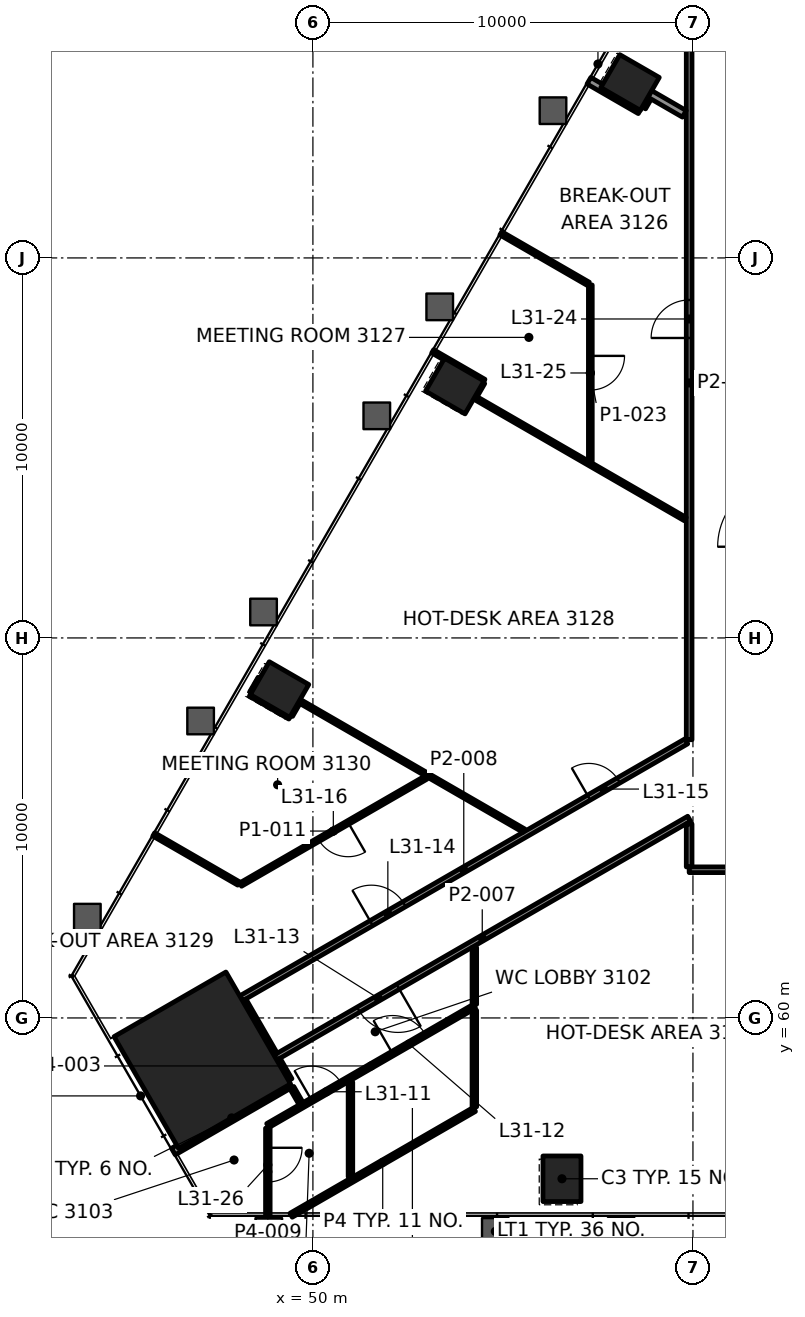
"""IFC4 building model, lengths in metres.
Left out: names, types, materials, properties, quantities, classifications, styles, units other than length and angle.
Written with IfcOpenShell. Run it as: python <this file> out.ifc"""

import sys

from ifc_helpers import new_model, si_unit, direction, frame, frame_2d, origin, origin_2d, place, context, subcontext, project, spatial, rectangle, extrude, element, fill, save


model = new_model("IFC4")
c1 = context("Model", 3, precision=1e-05, world=origin(), true_north=direction((0.0, 1.0)))
c2 = subcontext(c1, "Body", "Model", "MODEL_VIEW")
j1 = project(units=[si_unit("LENGTHUNIT", "METRE"), si_unit("PLANEANGLEUNIT", "RADIAN")], contexts=[c1])
p1 = place(None, origin())
s1 = spatial("IfcSite", under=j1, at=p1, CompositionType="ELEMENT")
p2 = place(p1, origin())
s2 = spatial("IfcBuilding", under=s1, at=p2, CompositionType="ELEMENT")
p3 = place(p2, frame((0.0, 0.0, 136.6)))
s3 = spatial("IfcBuildingStorey", under=s2, at=p3, CompositionType="ELEMENT", Elevation=136.6)
p4 = place(p3, frame((47.089, 58.886, 0.0), z_axis=(0.0, 0.0, 1.0), x_axis=(0.5, -0.866025403784, 0.0)))
e1 = element("IfcColumn", 1, at=p4, inside=s3, PredefinedType="COLUMN", context=c2, shape_type="SweptSolid", body=[
    extrude(rectangle(XDim=3.4, YDim=3.4, at=origin_2d()), origin(), (0.0, 0.0, 1.0), 4.2),
])
for number, where, z_axis, x_axis in (
    (2, (56.554, 55.768, -0.0), (0.0, 0.0, 1.0), (1.0, 0.0, 0.0)),
    (3, (58.345, 84.616, -0.0), (0.0, 0.0, 1.0), (-0.5, -0.866, 0.0)),
    (4, (53.733, 76.628, -0.0), (0.0, 0.0, 1.0), (-0.5, -0.866, 0.0)),
    (5, (49.122, 68.641, -0.0), (0.0, 0.0, 1.0), (-0.5, -0.866, 0.0)),
):
    element("IfcColumn", number, at=place(p3, frame(where, z_axis=z_axis, x_axis=x_axis)), inside=s3, PredefinedType="COLUMN", context=c2, shape_type="SweptSolid", body=[
        extrude(rectangle(XDim=1.0, YDim=1.2, at=origin_2d()), origin(), (0.0, 0.0, 1.0), 4.2),
    ])
p5 = place(p3, frame((90.1, 63.9, 0.0), z_axis=(0.0, 0.0, 1.0), x_axis=(-1.0, 0.0, 0.0)))
e6 = element("IfcWall", 6, at=p5, inside=s3, PredefinedType="PARTITIONING", context=c2, shape_type="SweptSolid", body=[
    extrude(rectangle(XDim=30.199, YDim=0.15, at=frame_2d((15.1, 0.0))), origin(), (0.0, 0.0, 1.0), 3.3),
])
p6 = place(p5, frame((5.999, 0.0, 0.0)))
e7 = element("IfcOpeningElement", 7, at=p6, cuts=e6, PredefinedType="OPENING", context=c2, shape_type="SweptSolid", body=[
    extrude(rectangle(XDim=1.0, YDim=2.1, at=frame_2d((0.5, 1.05))), frame((0.0, 0.085, 0.0), z_axis=(0.0, -1.0, 0.0), x_axis=(1.0, 0.0, 0.0)), (0.0, 0.0, 1.0), 0.17),
])
p7 = place(p5, frame((20.795, 0.0, 0.0)))
e8 = element("IfcOpeningElement", 8, at=p7, cuts=e6, PredefinedType="OPENING", context=c2, shape_type="SweptSolid", body=[
    extrude(rectangle(XDim=1.2, YDim=2.1, at=frame_2d((0.6, 1.05))), frame((0.0, 0.085, 0.0), z_axis=(0.0, -1.0, 0.0), x_axis=(1.0, 0.0, 0.0)), (0.0, 0.0, 1.0), 0.17),
])
p8 = place(p3, frame((49.427, 54.808, 0.0), z_axis=(0.0, 0.0, 1.0), x_axis=(0.866021245731, 0.500007201891, 0.0)))
e9 = element("IfcWall", 9, at=p8, inside=s3, PredefinedType="PARTITIONING", context=c2, shape_type="SweptSolid", body=[
    extrude(rectangle(XDim=5.566, YDim=0.12, at=frame_2d((2.783, 0.0))), origin(), (0.0, 0.0, 1.0), 3.3),
])
p9 = place(p3, frame((48.814, 57.168, 0.0), z_axis=(0.0, 0.0, 1.0), x_axis=(0.866009986161, 0.500026703156, 0.0)))
e10 = element("IfcWall", 10, at=p9, inside=s3, PredefinedType="PARTITIONING", context=c2, shape_type="SweptSolid", body=[
    extrude(rectangle(XDim=6.275, YDim=0.12, at=frame_2d((3.137, 0.0))), origin(), (0.0, 0.0, 1.0), 3.3),
])
p10 = place(p9, frame((1.329, 0.0, 0.0)))
e11 = element("IfcOpeningElement", 11, at=p10, cuts=e10, PredefinedType="OPENING", context=c2, shape_type="SweptSolid", body=[
    extrude(rectangle(XDim=0.9, YDim=2.1, at=frame_2d((0.45, 1.05))), frame((0.0, 0.07, 0.0), z_axis=(0.0, -1.0, 0.0), x_axis=(1.0, 0.0, 0.0)), (0.0, 0.0, 1.0), 0.14),
])
p11 = place(p9, frame((3.791, 0.0, 0.0)))
e12 = element("IfcOpeningElement", 12, at=p11, cuts=e10, PredefinedType="OPENING", context=c2, shape_type="SweptSolid", body=[
    extrude(rectangle(XDim=1.0, YDim=2.1, at=frame_2d((0.5, 1.05))), frame((0.0, 0.07, 0.0), z_axis=(0.0, -1.0, 0.0), x_axis=(1.0, 0.0, 0.0)), (0.0, 0.0, 1.0), 0.14),
])
p12 = place(p3, frame((46.329, 56.484, 0.0), z_axis=(0.0, 0.0, 1.0), x_axis=(0.866034141321, 0.499984865837, 0.0)))
e13 = element("IfcWall", 13, at=p12, inside=s3, PredefinedType="PARTITIONING", context=c2, shape_type="SweptSolid", body=[
    extrude(rectangle(XDim=3.543, YDim=0.2, at=frame_2d((1.772, 0.0))), origin(), (0.0, 0.0, 1.0), 3.3),
])
p13 = place(p3, frame((59.9, 65.243, 0.0), z_axis=(0.0, 0.0, 1.0), x_axis=(-0.866021305353, -0.500007098624, 0.0)))
e14 = element("IfcWall", 14, at=p13, inside=s3, PredefinedType="PARTITIONING", context=c2, shape_type="SweptSolid", body=[
    extrude(rectangle(XDim=12.572, YDim=0.15, at=frame_2d((6.286, 0.0))), origin(), (0.0, 0.0, 1.0), 3.147),
])
p14 = place(p13, frame((8.848, 0.0, 0.0)))
e15 = element("IfcOpeningElement", 15, at=p14, cuts=e14, PredefinedType="OPENING", context=c2, shape_type="SweptSolid", body=[
    extrude(rectangle(XDim=1.2, YDim=2.1, at=frame_2d((0.6, 1.05))), frame((0.0, 0.085, 0.0), z_axis=(0.0, -1.0, 0.0), x_axis=(1.0, 0.0, 0.0)), (0.0, 0.0, 1.0), 0.17),
])
p15 = place(p3, frame((48.114, 60.517, 0.0), z_axis=(0.0, 0.0, 1.0), x_axis=(0.866023530324, 0.500003244914, 0.0)))
e16 = element("IfcWall", 16, at=p15, inside=s3, PredefinedType="PARTITIONING", context=c2, shape_type="SweptSolid", body=[
    extrude(rectangle(XDim=13.522, YDim=0.15, at=frame_2d((6.761, 0.0))), origin(), (0.0, 0.0, 1.0), 3.3),
])
p16 = place(p15, frame((3.954, 0.0, 0.0)))
e17 = element("IfcOpeningElement", 17, at=p16, cuts=e16, PredefinedType="OPENING", context=c2, shape_type="SweptSolid", body=[
    extrude(rectangle(XDim=1.0, YDim=2.1, at=frame_2d((0.5, 1.05))), frame((0.0, 0.085, 0.0), z_axis=(0.0, -1.0, 0.0), x_axis=(1.0, 0.0, 0.0)), (0.0, 0.0, 1.0), 0.17),
])
p17 = place(p15, frame((10.562, 0.0, 0.0)))
e18 = element("IfcOpeningElement", 18, at=p17, cuts=e16, PredefinedType="OPENING", context=c2, shape_type="SweptSolid", body=[
    extrude(rectangle(XDim=0.9, YDim=2.1, at=frame_2d((0.45, 1.05))), frame((0.0, 0.085, 0.0), z_axis=(0.0, -1.0, 0.0), x_axis=(1.0, 0.0, 0.0)), (0.0, 0.0, 1.0), 0.17),
])
p18 = place(p3, frame((52.978, 66.327, 0.0), z_axis=(0.0, 0.0, 1.0), x_axis=(-0.86603265506, -0.499987440211, 0.0)))
e19 = element("IfcWall", 19, at=p18, inside=s3, PredefinedType="PARTITIONING", context=c2, shape_type="SweptSolid", body=[
    extrude(rectangle(XDim=5.636, YDim=0.1, at=frame_2d((2.818, 0.0))), origin(), (0.0, 0.0, 1.0), 3.3),
])
p19 = place(p18, frame((2.368, 0.0, 0.0)))
e20 = element("IfcOpeningElement", 20, at=p19, cuts=e19, PredefinedType="OPENING", context=c2, shape_type="SweptSolid", body=[
    extrude(rectangle(XDim=0.9, YDim=2.1, at=frame_2d((0.45, 1.05))), frame((0.0, 0.06, 0.0), z_axis=(0.0, -1.0, 0.0), x_axis=(1.0, 0.0, 0.0)), (0.0, 0.0, 1.0), 0.12),
])
p20 = place(p3, frame((49.421, 67.96, 0.0), z_axis=(0.0, 0.0, 1.0), x_axis=(0.500246304613, 0.865883153041, 0.0)))
e21 = element("IfcWall", 21, at=p20, inside=s3, PredefinedType="PARTITIONING", context=c2, shape_type="SweptSolid", body=[
    extrude(rectangle(XDim=0.39, YDim=0.1, at=frame_2d((0.195, 0.0))), origin(), (0.0, 0.0, 1.0), 3.3),
])
p21 = place(p3, frame((54.278, 76.372, 0.0), z_axis=(0.0, 0.0, 1.0), x_axis=(0.50002266109, 0.866012320003, 0.0)))
e22 = element("IfcWall", 22, at=p21, inside=s3, PredefinedType="PARTITIONING", context=c2, shape_type="SweptSolid", body=[
    extrude(rectangle(XDim=0.399, YDim=0.1, at=frame_2d((0.199, 0.0))), origin(), (0.0, 0.0, 1.0), 3.3),
])
p22 = place(p3, frame((58.666, 83.972, 0.0), z_axis=(0.0, 0.0, 1.0), x_axis=(0.500030943131, 0.866007538022, 0.0)))
e23 = element("IfcWall", 23, at=p22, inside=s3, PredefinedType="PARTITIONING", context=c2, shape_type="SweptSolid", body=[
    extrude(rectangle(XDim=0.297, YDim=0.2, at=frame_2d((0.148, 0.0))), origin(), (0.0, 0.0, 1.0), 3.3),
])
p23 = place(p3, frame((48.38, 68.557, 0.0), z_axis=(0.0, 0.0, 1.0), x_axis=(0.500406136638, 0.865790793677, 0.0)))
e24 = element("IfcWall", 24, at=p23, inside=s3, PredefinedType="PARTITIONING", context=c2, shape_type="SweptSolid", body=[
    extrude(rectangle(XDim=0.443, YDim=0.1, at=frame_2d((0.222, 0.0))), origin(), (0.0, 0.0, 1.0), 3.3),
])
p24 = place(p3, frame((59.9, 63.976, 0.0), z_axis=(0.0, 0.0, 1.0), x_axis=(0.0, 1.0, 0.0)))
e25 = element("IfcWall", 25, at=p24, inside=s3, PredefinedType="PARTITIONING", context=c2, shape_type="SweptSolid", body=[
    extrude(rectangle(XDim=1.131, YDim=0.15, at=frame_2d((0.565, 0.0))), origin(), (0.0, 0.0, 1.0), 3.147),
])
p25 = place(p3, frame((59.9, 67.321, 0.0), z_axis=(0.0, 0.0, 1.0), x_axis=(0.0, 1.0, 0.0)))
e26 = element("IfcWall", 26, at=p25, inside=s3, PredefinedType="PARTITIONING", context=c2, shape_type="SweptSolid", body=[
    extrude(rectangle(XDim=18.778, YDim=0.15, at=frame_2d((9.389, 0.0))), origin(), (0.0, 0.0, 1.0), 3.3),
])
p26 = place(p25, frame((10.572, 0.0, 0.0)))
e27 = element("IfcOpeningElement", 27, at=p26, cuts=e26, PredefinedType="OPENING", context=c2, shape_type="SweptSolid", body=[
    extrude(rectangle(XDim=1.0, YDim=2.1, at=frame_2d((0.5, 1.05))), frame((0.0, 0.085, 0.0), z_axis=(0.0, -1.0, 0.0), x_axis=(1.0, 0.0, 0.0)), (0.0, 0.0, 1.0), 0.17),
])
p27 = place(p3, frame((57.3, 79.288, 0.0), z_axis=(0.0, 0.0, 1.0), x_axis=(0.0, -1.0, 0.0)))
e28 = element("IfcWall", 28, at=p27, inside=s3, PredefinedType="PARTITIONING", context=c2, shape_type="SweptSolid", body=[
    extrude(rectangle(XDim=4.631, YDim=0.1, at=frame_2d((2.315, 0.0))), origin(), (0.0, 0.0, 1.0), 3.3),
])
p28 = place(p27, frame((1.865, 0.0, 0.0)))
e29 = element("IfcOpeningElement", 29, at=p28, cuts=e28, PredefinedType="OPENING", context=c2, shape_type="SweptSolid", body=[
    extrude(rectangle(XDim=0.9, YDim=2.1, at=frame_2d((0.45, 1.05))), frame((0.0, 0.06, 0.0), z_axis=(0.0, -1.0, 0.0), x_axis=(1.0, 0.0, 0.0)), (0.0, 0.0, 1.0), 0.12),
])
p29 = place(p3, frame((54.248, 57.661, 0.0), z_axis=(0.0, 0.0, 1.0), x_axis=(0.0, 1.0, 0.0)))
e30 = element("IfcWall", 30, at=p29, inside=s3, PredefinedType="PARTITIONING", context=c2, shape_type="SweptSolid", body=[
    extrude(rectangle(XDim=2.54, YDim=0.12, at=frame_2d((1.27, 0.0))), origin(), (0.0, 0.0, 1.0), 3.3),
])
p30 = place(p3, frame((50.988, 55.819, 0.0), z_axis=(0.0, 0.0, 1.0), x_axis=(0.0, 1.0, 0.0)))
e31 = element("IfcWall", 31, at=p30, inside=s3, PredefinedType="PARTITIONING", context=c2, shape_type="SweptSolid", body=[
    extrude(rectangle(XDim=2.495, YDim=0.12, at=frame_2d((1.248, 0.0))), origin(), (0.0, 0.0, 1.0), 3.3),
])
p31 = place(p3, frame((48.814, 57.099, 0.0), z_axis=(0.0, 0.0, 1.0), x_axis=(0.0, -1.0, 0.0)))
e32 = element("IfcWall", 32, at=p31, inside=s3, PredefinedType="PARTITIONING", context=c2, shape_type="SweptSolid", body=[
    extrude(rectangle(XDim=2.291, YDim=0.12, at=frame_2d((1.145, 0.0))), origin(), (0.0, 0.0, 1.0), 3.3),
])
p32 = place(p31, frame((0.515, 0.0, 0.0)))
e33 = element("IfcOpeningElement", 33, at=p32, cuts=e32, PredefinedType="OPENING", context=c2, shape_type="SweptSolid", body=[
    extrude(rectangle(XDim=0.9, YDim=2.1, at=frame_2d((0.45, 1.05))), frame((0.0, 0.07, 0.0), z_axis=(0.0, -1.0, 0.0), x_axis=(1.0, 0.0, 0.0)), (0.0, 0.0, 1.0), 0.14),
])
p33 = place(p3, frame((49.362, 58.351, 0.0), z_axis=(0.0, 0.0, 1.0), x_axis=(-0.499880341542, 0.866094477606, 0.0)))
e34 = element("IfcWall", 34, at=p33, inside=s3, PredefinedType="PARTITIONING", context=c2, shape_type="SweptSolid", body=[
    extrude(rectangle(XDim=0.625, YDim=0.2, at=frame_2d((0.312, 0.0))), origin(), (0.0, 0.0, 1.0), 3.3),
])
p34 = place(p3, frame((49.685, 57.751, 0.0), z_axis=(0.0, 0.0, 1.0), x_axis=(-0.499913221443, 0.866075499611, 0.0)))
e35 = element("IfcWall", 35, at=p34, inside=s3, PredefinedType="PARTITIONING", context=c2, shape_type="SweptSolid", body=[
    extrude(rectangle(XDim=0.48, YDim=0.12, at=frame_2d((0.24, 0.0))), origin(), (0.0, 0.0, 1.0), 3.3),
])
p35 = place(p3, frame((59.773, 83.792, 0.0), z_axis=(0.0, 0.0, 1.0), x_axis=(-0.866057688017, 0.499944077899, 0.0)))
e36 = element("IfcWall", 36, at=p35, inside=s3, PredefinedType="PARTITIONING", context=c2, shape_type="SweptSolid", body=[
    extrude(rectangle(XDim=1.049, YDim=0.2, at=frame_2d((0.524, 0.0))), origin(), (0.0, 0.0, 1.0), 3.3),
])
p36 = place(p3, frame((58.612, 83.885, 0.0), z_axis=(0.0, 0.0, 1.0), x_axis=(-0.866005410122, 0.500034628441, 0.0)))
e37 = element("IfcWall", 37, at=p36, inside=s3, PredefinedType="PARTITIONING", context=c2, shape_type="SweptSolid", body=[
    extrude(rectangle(XDim=1.557, YDim=0.2, at=frame_2d((0.779, 0.0))), origin(), (0.0, 0.0, 1.0), 3.065),
])
p37 = place(p3, frame((57.25, 79.316, 0.0), z_axis=(0.0, 0.0, 1.0), x_axis=(-0.866038956489, 0.499976525293, 0.0)))
e38 = element("IfcWall", 38, at=p37, inside=s3, PredefinedType="PARTITIONING", context=c2, shape_type="SweptSolid", body=[
    extrude(rectangle(XDim=2.662, YDim=0.1, at=frame_2d((1.331, 0.0))), origin(), (0.0, 0.0, 1.0), 3.065),
])
p38 = place(p3, frame((54.502, 76.762, 0.0), z_axis=(0.0, 0.0, 1.0), x_axis=(-0.866018739521, 0.500011542666, 0.0)))
e39 = element("IfcWall", 39, at=p38, inside=s3, PredefinedType="PARTITIONING", context=c2, shape_type="SweptSolid", body=[
    extrude(rectangle(XDim=1.56, YDim=0.1, at=frame_2d((0.78, 0.0))), origin(), (0.0, 0.0, 1.0), 3.065),
])
p39 = place(p3, frame((59.799, 73.126, 0.0), z_axis=(0.0, 0.0, 1.0), x_axis=(-0.866017336907, 0.500013971981, 0.0)))
e40 = element("IfcWall", 40, at=p39, inside=s3, PredefinedType="PARTITIONING", context=c2, shape_type="SweptSolid", body=[
    extrude(rectangle(XDim=6.404, YDim=0.1, at=frame_2d((3.202, 0.0))), origin(), (0.0, 0.0, 1.0), 3.3),
])
p40 = place(p3, frame((55.553, 64.928, 0.0), z_axis=(0.0, 0.0, 1.0), x_axis=(-0.866024775297, 0.500001088571, 0.0)))
e41 = element("IfcWall", 41, at=p40, inside=s3, PredefinedType="PARTITIONING", context=c2, shape_type="SweptSolid", body=[
    extrude(rectangle(XDim=6.826, YDim=0.1, at=frame_2d((3.413, 0.0))), origin(), (0.0, 0.0, 1.0), 3.3),
])
p41 = place(p3, frame((49.391, 67.908, 0.0), z_axis=(0.0, 0.0, 1.0), x_axis=(-0.866006032174, 0.500033551112, 0.0)))
e42 = element("IfcWall", 42, at=p41, inside=s3, PredefinedType="PARTITIONING", context=c2, shape_type="SweptSolid", body=[
    extrude(rectangle(XDim=1.2, YDim=0.1, at=frame_2d((0.6, 0.0))), origin(), (0.0, 0.0, 1.0), 3.3),
])
p42 = place(p3, frame((48.047, 63.538, 0.0), z_axis=(0.0, 0.0, 1.0), x_axis=(-0.866010727845, 0.500025418611, 0.0)))
e43 = element("IfcWall", 43, at=p42, inside=s3, PredefinedType="PARTITIONING", context=c2, shape_type="SweptSolid", body=[
    extrude(rectangle(XDim=2.581, YDim=0.1, at=frame_2d((1.291, 0.0))), origin(), (0.0, 0.0, 1.0), 3.3),
])
p43 = place(p3, frame((54.248, 60.357, 0.0), z_axis=(0.0, 0.0, 1.0), x_axis=(0.0, 1.0, 0.0)))
e44 = element("IfcWall", 44, at=p43, inside=s3, PredefinedType="PARTITIONING", context=c2, shape_type="SweptSolid", body=[
    extrude(rectangle(XDim=1.496, YDim=0.12, at=frame_2d((0.748, 0.0))), origin(), (0.0, 0.0, 1.0), 3.3),
])
p44 = place(p3, frame((48.975, 59.022, 0.0), z_axis=(0.0, 0.0, 1.0), x_axis=(-0.500013311227, 0.866017718408, 0.0)))
e45 = element("IfcWall", 45, at=p44, inside=s3, PredefinedType="PARTITIONING", context=c2, shape_type="SweptSolid", body=[
    extrude(rectangle(XDim=1.647, YDim=0.2, at=frame_2d((0.823, 0.0))), origin(), (0.0, 0.0, 1.0), 3.147),
])
p45 = place(p10, origin())
e46 = element("IfcDoor", 46, at=p45, inside=s3, OperationType="SINGLE_SWING_LEFT", PredefinedType="DOOR", context=c2, shape_type="SweptSolid", body=[
    extrude(rectangle(XDim=0.9, YDim=2.1, at=frame_2d((0.45, 1.05))), frame((0.0, 0.025, 0.0), z_axis=(0.0, -1.0, 0.0), x_axis=(1.0, 0.0, 0.0)), (0.0, 0.0, 1.0), 0.05),
])
fill(e11, e46)
p46 = place(p11, origin())
e47 = element("IfcDoor", 47, at=p46, inside=s3, OperationType="SINGLE_SWING_RIGHT", PredefinedType="DOOR", context=c2, shape_type="SweptSolid", body=[
    extrude(rectangle(XDim=1.0, YDim=2.1, at=frame_2d((0.5, 1.05))), frame((0.0, 0.025, 0.0), z_axis=(0.0, -1.0, 0.0), x_axis=(1.0, 0.0, 0.0)), (0.0, 0.0, 1.0), 0.05),
])
fill(e12, e47)
p47 = place(p14, origin())
e48 = element("IfcDoor", 48, at=p47, inside=s3, OperationType="DOUBLE_DOOR_SINGLE_SWING", PredefinedType="DOOR", context=c2, shape_type="SweptSolid", body=[
    extrude(rectangle(XDim=1.2, YDim=2.1, at=frame_2d((0.6, 1.05))), frame((0.0, 0.025, 0.0), z_axis=(0.0, -1.0, 0.0), x_axis=(1.0, 0.0, 0.0)), (0.0, 0.0, 1.0), 0.05),
])
fill(e15, e48)
p48 = place(p16, origin())
e49 = element("IfcDoor", 49, at=p48, inside=s3, OperationType="SINGLE_SWING_RIGHT", PredefinedType="DOOR", context=c2, shape_type="SweptSolid", body=[
    extrude(rectangle(XDim=1.0, YDim=2.1, at=frame_2d((0.5, 1.05))), frame((0.0, 0.025, 0.0), z_axis=(0.0, -1.0, 0.0), x_axis=(1.0, 0.0, 0.0)), (0.0, 0.0, 1.0), 0.05),
])
fill(e17, e49)
p49 = place(p17, origin())
e50 = element("IfcDoor", 50, at=p49, inside=s3, OperationType="SINGLE_SWING_LEFT", PredefinedType="DOOR", context=c2, shape_type="SweptSolid", body=[
    extrude(rectangle(XDim=0.9, YDim=2.1, at=frame_2d((0.45, 1.05))), frame((0.0, 0.025, 0.0), z_axis=(0.0, -1.0, 0.0), x_axis=(1.0, 0.0, 0.0)), (0.0, 0.0, 1.0), 0.05),
])
fill(e18, e50)
p50 = place(p19, origin())
e51 = element("IfcDoor", 51, at=p50, inside=s3, OperationType="SINGLE_SWING_RIGHT", PredefinedType="DOOR", context=c2, shape_type="SweptSolid", body=[
    extrude(rectangle(XDim=0.9, YDim=2.1, at=frame_2d((0.45, 1.05))), frame((0.0, 0.025, 0.0), z_axis=(0.0, -1.0, 0.0), x_axis=(1.0, 0.0, 0.0)), (0.0, 0.0, 1.0), 0.05),
])
fill(e20, e51)
p51 = place(p26, origin())
e52 = element("IfcDoor", 52, at=p51, inside=s3, OperationType="SINGLE_SWING_LEFT", PredefinedType="DOOR", context=c2, shape_type="SweptSolid", body=[
    extrude(rectangle(XDim=1.0, YDim=2.1, at=frame_2d((0.5, 1.05))), frame((0.0, 0.025, 0.0), z_axis=(0.0, -1.0, 0.0), x_axis=(1.0, 0.0, 0.0)), (0.0, 0.0, 1.0), 0.05),
])
fill(e27, e52)
p52 = place(p28, origin())
e53 = element("IfcDoor", 53, at=p52, inside=s3, OperationType="SINGLE_SWING_LEFT", PredefinedType="DOOR", context=c2, shape_type="SweptSolid", body=[
    extrude(rectangle(XDim=0.9, YDim=2.1, at=frame_2d((0.45, 1.05))), frame((0.0, 0.025, 0.0), z_axis=(0.0, -1.0, 0.0), x_axis=(1.0, 0.0, 0.0)), (0.0, 0.0, 1.0), 0.05),
])
fill(e29, e53)
p53 = place(p32, origin())
e54 = element("IfcDoor", 54, at=p53, inside=s3, OperationType="SINGLE_SWING_LEFT", PredefinedType="DOOR", context=c2, shape_type="SweptSolid", body=[
    extrude(rectangle(XDim=0.9, YDim=2.1, at=frame_2d((0.45, 1.05))), frame((0.0, 0.025, 0.0), z_axis=(0.0, -1.0, 0.0), x_axis=(1.0, 0.0, 0.0)), (0.0, 0.0, 1.0), 0.05),
])
fill(e33, e54)
save(model, sys.argv[1])
